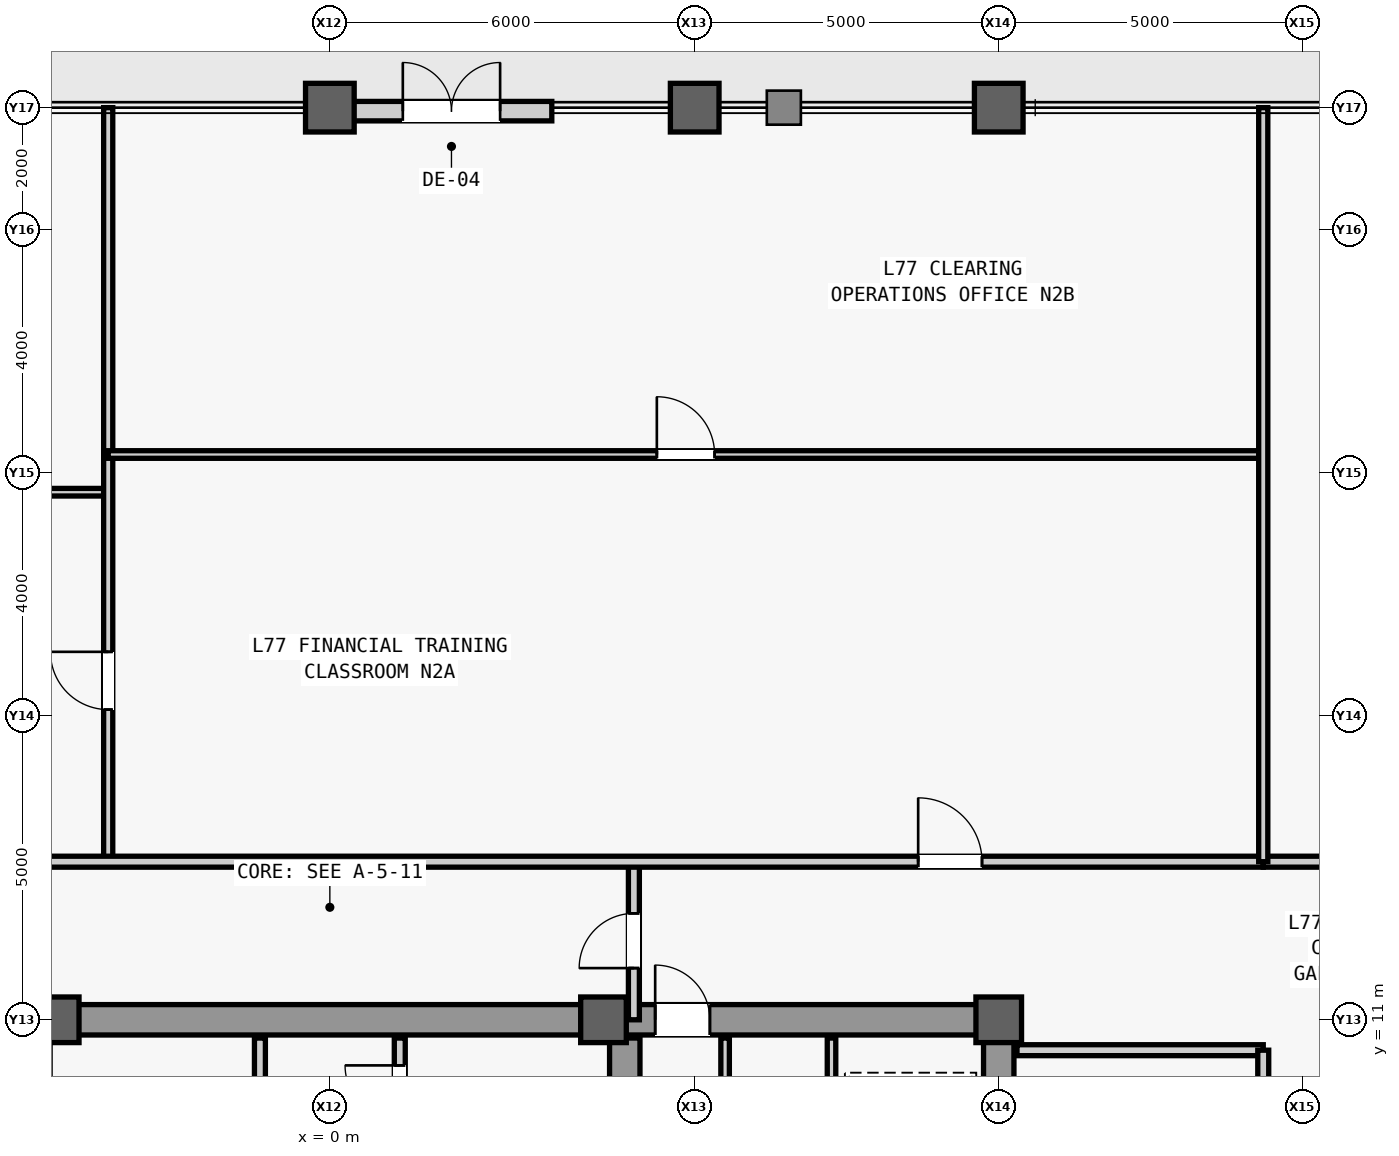
"""IFC4 building model, lengths in metres.
Left out: names, types, materials, properties, quantities, classifications, styles, units other than length and angle.
Written with IfcOpenShell. Run it as: python <this file> out.ifc"""

import sys

from ifc_helpers import new_model, si_unit, direction, frame, frame_2d, origin, origin_2d, place, context, subcontext, project, spatial, rectangle, hollow_rectangle, extrude, source, transform, mapped, element, fill, save


model = new_model("IFC4")
c1 = context("Model", 3, precision=1e-05, world=origin(), true_north=direction((0.0, 1.0)))
c2 = subcontext(c1, "Body", "Model", "MODEL_VIEW")
j1 = project(units=[si_unit("LENGTHUNIT", "METRE"), si_unit("PLANEANGLEUNIT", "RADIAN")], contexts=[c1])
p1 = place(None, origin())
s1 = spatial("IfcSite", under=j1, at=p1, CompositionType="ELEMENT")
p2 = place(p1, origin())
s2 = spatial("IfcBuilding", under=s1, at=p2, CompositionType="ELEMENT")
p3 = place(p2, frame((0.0, 0.0, 326.3)))
s3 = spatial("IfcBuildingStorey", under=s2, at=p3, CompositionType="ELEMENT", Elevation=326.3)
m1 = source(origin(), c2, "Body", "SweptSolid", [
    extrude(rectangle(XDim=22.0, YDim=0.5, at=frame_2d((11.0, 0.0))), origin(), (0.0, 0.0, 1.0), 3.74),
])
p4 = place(p3, frame((11.0, -11.0, 0.0), z_axis=(0.0, 0.0, 1.0), x_axis=(0.0, 1.0, 0.0)))
e1 = element("IfcWall", 1, at=p4, inside=s3, PredefinedType="SHEAR", context=c2, shape_type="MappedRepresentation", body=[
    mapped(m1, transform((0.0, 0.0, 0.0), scale=1.0)),
])
m2 = source(origin(), c2, "Body", "SweptSolid", [
    extrude(rectangle(XDim=1.1, YDim=2.2, at=frame_2d((0.55, 1.1))), frame((0.0, 0.26, 0.0), z_axis=(0.0, -1.0, 0.0), x_axis=(1.0, 0.0, 0.0)), (0.0, 0.0, 1.0), 0.52),
])
p5 = place(p4, frame((0.8, 0.0, 0.0)))
e2 = element("IfcOpeningElement", 2, at=p5, cuts=e1, PredefinedType="OPENING", context=c2, shape_type="MappedRepresentation", body=[
    mapped(m2, transform((0.0, 0.0, 0.0), scale=1.0)),
])
m3 = source(origin(), c2, "Body", "SweptSolid", [
    extrude(rectangle(XDim=0.9, YDim=2.15, at=frame_2d((0.45, 1.075))), frame((0.0, 0.26, 0.0), z_axis=(0.0, -1.0, 0.0), x_axis=(1.0, 0.0, 0.0)), (0.0, 0.0, 1.0), 0.52),
])
p6 = place(p4, frame((7.575, 0.0, 0.0)))
e3 = element("IfcOpeningElement", 3, at=p6, cuts=e1, PredefinedType="OPENING", context=c2, shape_type="MappedRepresentation", body=[
    mapped(m3, transform((0.0, 0.0, 0.0), scale=1.0)),
])
m4 = source(origin(), c2, "Body", "SweptSolid", [
    extrude(rectangle(XDim=1.2, YDim=2.3, at=frame_2d((0.6, 1.15))), frame((0.0, 0.26, 0.0), z_axis=(0.0, -1.0, 0.0), x_axis=(1.0, 0.0, 0.0)), (0.0, 0.0, 1.0), 0.52),
])
p7 = place(p4, frame((17.6, 0.0, 0.0)))
e4 = element("IfcOpeningElement", 4, at=p7, cuts=e1, PredefinedType="OPENING", context=c2, shape_type="MappedRepresentation", body=[
    mapped(m4, transform((0.0, 0.0, 0.0), scale=1.0)),
])
p8 = place(p4, frame((19.6, 0.0, 0.0)))
e5 = element("IfcOpeningElement", 5, at=p8, cuts=e1, PredefinedType="OPENING", context=c2, shape_type="MappedRepresentation", body=[
    mapped(m4, transform((0.0, 0.0, 0.0), scale=1.0)),
])
m5 = source(origin(), c2, "Body", "SweptSolid", [
    extrude(rectangle(XDim=1.3, YDim=2.3, at=frame_2d((0.65, 1.15))), frame((0.0, 0.26, 0.0), z_axis=(0.0, -1.0, 0.0), x_axis=(1.0, 0.0, 0.0)), (0.0, 0.0, 1.0), 0.52),
])
p9 = place(p4, frame((2.7, 0.0, 0.0)))
e6 = element("IfcOpeningElement", 6, at=p9, cuts=e1, PredefinedType="OPENING", context=c2, shape_type="MappedRepresentation", body=[
    mapped(m5, transform((0.0, 0.0, 0.0), scale=1.0)),
])
p10 = place(p4, frame((13.35, 0.0, 0.0)))
e7 = element("IfcOpeningElement", 7, at=p10, cuts=e1, PredefinedType="OPENING", context=c2, shape_type="MappedRepresentation", body=[
    mapped(m5, transform((0.0, 0.0, 0.0), scale=1.0)),
])
m6 = source(origin(), c2, "Body", "SweptSolid", [
    extrude(rectangle(XDim=21.4, YDim=0.5, at=frame_2d((10.7, 0.0))), origin(), (0.0, 0.0, 1.0), 3.74),
])
p11 = place(p3, frame((4.85, -10.7, 0.0), z_axis=(0.0, 0.0, 1.0), x_axis=(0.0, 1.0, 0.0)))
e8 = element("IfcWall", 8, at=p11, inside=s3, PredefinedType="SHEAR", context=c2, shape_type="MappedRepresentation", body=[
    mapped(m6, transform((0.0, 0.0, 0.0), scale=1.0)),
])
m7 = source(origin(), c2, "Body", "SweptSolid", [
    extrude(rectangle(XDim=5.9, YDim=0.5, at=frame_2d((2.95, 0.0))), origin(), (0.0, 0.0, 1.0), 3.74),
])
p12 = place(p3, frame((4.85, 11.0, 0.0), z_axis=(0.0, 0.0, 1.0), x_axis=(1.0, 0.0, 0.0)))
e9 = element("IfcWall", 9, at=p12, inside=s3, PredefinedType="SHEAR", context=c2, shape_type="MappedRepresentation", body=[
    mapped(m7, transform((0.0, 0.0, 0.0), scale=1.0)),
])
p13 = place(p12, frame((0.5, 0.0, 0.0)))
e10 = element("IfcOpeningElement", 10, at=p13, cuts=e9, PredefinedType="OPENING", context=c2, shape_type="MappedRepresentation", body=[
    mapped(m3, transform((0.0, 0.0, 0.0), scale=1.0)),
])
m8 = source(origin(), c2, "Body", "SweptSolid", [
    extrude(rectangle(XDim=9.2, YDim=0.5, at=frame_2d((4.6, 0.0))), origin(), (0.0, 0.0, 1.0), 3.74),
])
p14 = place(p3, frame((-4.6, 11.0, 0.0), z_axis=(0.0, 0.0, 1.0), x_axis=(1.0, 0.0, 0.0)))
e11 = element("IfcWall", 11, at=p14, inside=s3, PredefinedType="SHEAR", context=c2, shape_type="MappedRepresentation", body=[
    mapped(m8, transform((0.0, 0.0, 0.0), scale=1.0)),
])
m9 = source(origin(), c2, "Body", "SweptSolid", [
    extrude(rectangle(XDim=0.75, YDim=0.75, at=origin_2d()), origin(), (0.0, 0.0, 1.0), 4.0),
])
p15 = place(p3, frame((-4.5, 11.0, 0.0), z_axis=(0.0, 0.0, 1.0), x_axis=(1.0, 0.0, 0.0)))
e12 = element("IfcColumn", 12, at=p15, inside=s3, PredefinedType="COLUMN", context=c2, shape_type="MappedRepresentation", body=[
    mapped(m9, transform((0.0, 0.0, 0.0), scale=1.0)),
])
m10 = source(origin(), c2, "Body", "SweptSolid", [
    extrude(hollow_rectangle(XDim=0.8, YDim=0.8, WallThickness=0.045, at=origin_2d()), origin(), (0.0, 0.0, 1.0), 4.0),
])
p16 = place(p3, frame((0.0, 26.0, 0.0), z_axis=(0.0, 0.0, 1.0), x_axis=(1.0, 0.0, 0.0)))
e13 = element("IfcColumn", 13, at=p16, inside=s3, PredefinedType="COLUMN", context=c2, shape_type="MappedRepresentation", body=[
    mapped(m10, transform((0.0, 0.0, 0.0), scale=1.0)),
])
p17 = place(p3, frame((4.5, 11.0, 0.0), z_axis=(0.0, 0.0, 1.0), x_axis=(1.0, 0.0, 0.0)))
e14 = element("IfcColumn", 14, at=p17, inside=s3, PredefinedType="COLUMN", context=c2, shape_type="MappedRepresentation", body=[
    mapped(m9, transform((0.0, 0.0, 0.0), scale=1.0)),
])
p18 = place(p3, frame((6.0, 26.0, 0.0), z_axis=(0.0, 0.0, 1.0), x_axis=(1.0, 0.0, 0.0)))
e15 = element("IfcColumn", 15, at=p18, inside=s3, PredefinedType="COLUMN", context=c2, shape_type="MappedRepresentation", body=[
    mapped(m10, transform((0.0, 0.0, 0.0), scale=1.0)),
])
p19 = place(p3, frame((11.0, 11.0, 0.0), z_axis=(0.0, 0.0, 1.0), x_axis=(1.0, 0.0, 0.0)))
e16 = element("IfcColumn", 16, at=p19, inside=s3, PredefinedType="COLUMN", context=c2, shape_type="MappedRepresentation", body=[
    mapped(m9, transform((0.0, 0.0, 0.0), scale=1.0)),
])
p20 = place(p3, frame((11.0, 26.0, 0.0), z_axis=(0.0, 0.0, 1.0), x_axis=(1.0, 0.0, 0.0)))
e17 = element("IfcColumn", 17, at=p20, inside=s3, PredefinedType="COLUMN", context=c2, shape_type="MappedRepresentation", body=[
    mapped(m10, transform((0.0, 0.0, 0.0), scale=1.0)),
])
m11 = source(origin(), c2, "Body", "SweptSolid", [
    extrude(rectangle(XDim=3.3, YDim=0.32, at=frame_2d((1.65, 0.0))), origin(), (0.0, 0.0, 1.0), 3.191),
])
p21 = place(p3, frame((0.35, 25.942, 0.0), z_axis=(0.0, 0.0, 1.0), x_axis=(1.0, 0.0, 0.0)))
e18 = element("IfcWall", 18, at=p21, inside=s3, PredefinedType="STANDARD", context=c2, shape_type="MappedRepresentation", body=[
    mapped(m11, transform((0.0, 0.0, 0.0), scale=1.0)),
])
m12 = source(origin(), c2, "Body", "SweptSolid", [
    extrude(rectangle(XDim=1.6, YDim=2.25, at=frame_2d((0.8, 1.125))), frame((0.0, 0.17, 0.0), z_axis=(0.0, -1.0, 0.0), x_axis=(1.0, 0.0, 0.0)), (0.0, 0.0, 1.0), 0.34),
])
p22 = place(p21, frame((0.85, 0.0, 0.0)))
e19 = element("IfcOpeningElement", 19, at=p22, cuts=e18, PredefinedType="OPENING", context=c2, shape_type="MappedRepresentation", body=[
    mapped(m12, transform((0.0, 0.0, 0.0), scale=1.0)),
])
m13 = source(origin(), c2, "Body", "SweptSolid", [
    extrude(rectangle(XDim=9.4, YDim=0.14, at=frame_2d((4.7, 0.0))), origin(), (0.0, 0.0, 1.0), 3.74),
])
p23 = place(p3, frame((8.25, 1.3, 0.0), z_axis=(0.0, 0.0, 1.0), x_axis=(0.0, 1.0, 0.0)))
e20 = element("IfcWall", 20, at=p23, inside=s3, PredefinedType="PARTITIONING", context=c2, shape_type="MappedRepresentation", body=[
    mapped(m13, transform((0.0, 0.0, 0.0), scale=1.0)),
])
m14 = source(origin(), c2, "Body", "SweptSolid", [
    extrude(rectangle(XDim=5.7, YDim=0.14, at=frame_2d((2.85, 0.0))), origin(), (0.0, 0.0, 1.0), 3.74),
])
p24 = place(p3, frame((6.5, 5.0, 0.0), z_axis=(0.0, 0.0, 1.0), x_axis=(0.0, 1.0, 0.0)))
e21 = element("IfcWall", 21, at=p24, inside=s3, PredefinedType="PARTITIONING", context=c2, shape_type="MappedRepresentation", body=[
    mapped(m14, transform((0.0, 0.0, 0.0), scale=1.0)),
])
m15 = source(origin(), c2, "Body", "SweptSolid", [
    extrude(rectangle(XDim=0.9, YDim=2.15, at=frame_2d((0.45, 1.075))), frame((0.0, 0.08, 0.0), z_axis=(0.0, -1.0, 0.0), x_axis=(1.0, 0.0, 0.0)), (0.0, 0.0, 1.0), 0.16),
])
p25 = place(p24, frame((2.05, 0.0, 0.0)))
e22 = element("IfcOpeningElement", 22, at=p25, cuts=e21, PredefinedType="OPENING", context=c2, shape_type="MappedRepresentation", body=[
    mapped(m15, transform((0.0, 0.0, 0.0), scale=1.0)),
])
m16 = source(origin(), c2, "Body", "SweptSolid", [
    extrude(rectangle(XDim=4.05, YDim=0.18, at=frame_2d((2.025, 0.0))), origin(), (0.0, 0.0, 1.0), 3.74),
])
p26 = place(p3, frame((11.3, 10.5, 0.0), z_axis=(0.0, 0.0, 1.0), x_axis=(1.0, 0.0, 0.0)))
e23 = element("IfcWall", 23, at=p26, inside=s3, PredefinedType="PARTITIONING", context=c2, shape_type="MappedRepresentation", body=[
    mapped(m16, transform((0.0, 0.0, 0.0), scale=1.0)),
])
m17 = source(origin(), c2, "Body", "SweptSolid", [
    extrude(rectangle(XDim=16.6, YDim=0.18, at=frame_2d((8.3, 0.0))), origin(), (0.0, 0.0, 1.0), 3.74),
])
p27 = place(p3, frame((15.35, -6.1, 0.0), z_axis=(0.0, 0.0, 1.0), x_axis=(0.0, 1.0, 0.0)))
e24 = element("IfcWall", 24, at=p27, inside=s3, PredefinedType="PARTITIONING", context=c2, shape_type="MappedRepresentation", body=[
    mapped(m17, transform((0.0, 0.0, 0.0), scale=1.0)),
])
m18 = source(origin(), c2, "Body", "SweptSolid", [
    extrude(rectangle(XDim=1.8, YDim=2.25, at=frame_2d((0.9, 1.125))), frame((0.0, 0.1, 0.0), z_axis=(0.0, -1.0, 0.0), x_axis=(1.0, 0.0, 0.0)), (0.0, 0.0, 1.0), 0.2),
])
p28 = place(p27, frame((2.7, 0.0, 0.0)))
e25 = element("IfcOpeningElement", 25, at=p28, cuts=e24, PredefinedType="OPENING", context=c2, shape_type="MappedRepresentation", body=[
    mapped(m18, transform((0.0, 0.0, 0.0), scale=1.0)),
])
p29 = place(p27, frame((13.0, 0.0, 0.0)))
e26 = element("IfcOpeningElement", 26, at=p29, cuts=e24, PredefinedType="OPENING", context=c2, shape_type="MappedRepresentation", body=[
    mapped(m18, transform((0.0, 0.0, 0.0), scale=1.0)),
])
m19 = source(origin(), c2, "Body", "SweptSolid", [
    extrude(rectangle(XDim=5.4, YDim=0.18, at=frame_2d((2.7, 0.0))), origin(), (0.0, 0.0, 1.0), 3.74),
])
p30 = place(p3, frame((-1.15, 5.3, 0.0), z_axis=(0.0, 0.0, 1.0), x_axis=(0.0, 1.0, 0.0)))
e27 = element("IfcWall", 27, at=p30, inside=s3, PredefinedType="PARTITIONING", context=c2, shape_type="MappedRepresentation", body=[
    mapped(m19, transform((0.0, 0.0, 0.0), scale=1.0)),
])
m20 = source(origin(), c2, "Body", "SweptSolid", [
    extrude(rectangle(XDim=0.9, YDim=2.15, at=frame_2d((0.45, 1.075))), frame((0.0, 0.1, 0.0), z_axis=(0.0, -1.0, 0.0), x_axis=(1.0, 0.0, 0.0)), (0.0, 0.0, 1.0), 0.2),
])
p31 = place(p30, frame((0.7, 0.0, 0.0)))
e28 = element("IfcOpeningElement", 28, at=p31, cuts=e27, PredefinedType="OPENING", context=c2, shape_type="MappedRepresentation", body=[
    mapped(m20, transform((0.0, 0.0, 0.0), scale=1.0)),
])
p32 = place(p30, frame((3.4, 0.0, 0.0)))
e29 = element("IfcOpeningElement", 29, at=p32, cuts=e27, PredefinedType="OPENING", context=c2, shape_type="MappedRepresentation", body=[
    mapped(m20, transform((0.0, 0.0, 0.0), scale=1.0)),
])
p33 = place(p3, frame((1.15, 5.3, 0.0), z_axis=(0.0, 0.0, 1.0), x_axis=(0.0, 1.0, 0.0)))
e30 = element("IfcWall", 30, at=p33, inside=s3, PredefinedType="PARTITIONING", context=c2, shape_type="MappedRepresentation", body=[
    mapped(m19, transform((0.0, 0.0, 0.0), scale=1.0)),
])
p34 = place(p33, frame((0.45, 0.0, 0.0)))
e31 = element("IfcOpeningElement", 31, at=p34, cuts=e30, PredefinedType="OPENING", context=c2, shape_type="MappedRepresentation", body=[
    mapped(m20, transform((0.0, 0.0, 0.0), scale=1.0)),
])
p35 = place(p33, frame((2.25, 0.0, 0.0)))
e32 = element("IfcOpeningElement", 32, at=p35, cuts=e30, PredefinedType="OPENING", context=c2, shape_type="MappedRepresentation", body=[
    mapped(m20, transform((0.0, 0.0, 0.0), scale=1.0)),
])
p36 = place(p33, frame((4.05, 0.0, 0.0)))
e33 = element("IfcOpeningElement", 33, at=p36, cuts=e30, PredefinedType="OPENING", context=c2, shape_type="MappedRepresentation", body=[
    mapped(m20, transform((0.0, 0.0, 0.0), scale=1.0)),
])
m21 = source(origin(), c2, "Body", "SweptSolid", [
    extrude(rectangle(XDim=2.6, YDim=0.18, at=frame_2d((1.3, 0.0))), origin(), (0.0, 0.0, 1.0), 3.74),
])
p37 = place(p3, frame((5.0, 11.0, 0.0), z_axis=(0.0, 0.0, 1.0), x_axis=(0.0, 1.0, 0.0)))
e34 = element("IfcWall", 34, at=p37, inside=s3, PredefinedType="PARTITIONING", context=c2, shape_type="MappedRepresentation", body=[
    mapped(m21, transform((0.0, 0.0, 0.0), scale=1.0)),
])
p38 = place(p37, frame((0.85, 0.0, 0.0)))
e35 = element("IfcOpeningElement", 35, at=p38, cuts=e34, PredefinedType="OPENING", context=c2, shape_type="MappedRepresentation", body=[
    mapped(m20, transform((0.0, 0.0, 0.0), scale=1.0)),
])
m22 = source(origin(), c2, "Body", "SweptSolid", [
    extrude(rectangle(XDim=2.4, YDim=0.18, at=frame_2d((1.2, 0.0))), origin(), (0.0, 0.0, 1.0), 3.74),
])
p39 = place(p3, frame((15.35, 13.6, 0.0), z_axis=(0.0, 0.0, 1.0), x_axis=(1.0, 0.0, 0.0)))
e36 = element("IfcWall", 36, at=p39, inside=s3, PredefinedType="PARTITIONING", context=c2, shape_type="MappedRepresentation", body=[
    mapped(m22, transform((0.0, 0.0, 0.0), scale=1.0)),
])
m23 = source(origin(), c2, "Body", "SweptSolid", [
    extrude(rectangle(XDim=13.755, YDim=0.125, at=frame_2d((6.877, 0.0))), origin(), (0.0, 0.0, 1.0), 3.393),
])
p40 = place(p3, frame((-17.4, 19.676, 0.0), z_axis=(0.0, 0.0, 1.0), x_axis=(1.0, 0.0, 0.0)))
e37 = element("IfcWall", 37, at=p40, inside=s3, PredefinedType="PARTITIONING", context=c2, shape_type="MappedRepresentation", body=[
    mapped(m23, transform((0.0, 0.0, 0.0), scale=1.0)),
])
m24 = source(origin(), c2, "Body", "SweptSolid", [
    extrude(rectangle(XDim=0.95, YDim=2.15, at=frame_2d((0.475, 1.075))), frame((0.0, 0.073, 0.0), z_axis=(0.0, -1.0, 0.0), x_axis=(1.0, 0.0, 0.0)), (0.0, 0.0, 1.0), 0.145),
])
p41 = place(p40, frame((6.403, 0.0, 0.0)))
e38 = element("IfcOpeningElement", 38, at=p41, cuts=e37, PredefinedType="OPENING", context=c2, shape_type="MappedRepresentation", body=[
    mapped(m24, transform((0.0, 0.0, 0.0), scale=1.0)),
])
m25 = source(origin(), c2, "Body", "SweptSolid", [
    extrude(rectangle(XDim=12.4, YDim=0.15, at=frame_2d((6.2, 0.0))), origin(), (0.0, 0.0, 1.0), 3.74),
])
p42 = place(p3, frame((-3.645, 13.6, 0.0), z_axis=(0.0, 0.0, 1.0), x_axis=(0.0, 1.0, 0.0)))
e39 = element("IfcWall", 39, at=p42, inside=s3, PredefinedType="PARTITIONING", context=c2, shape_type="MappedRepresentation", body=[
    mapped(m25, transform((0.0, 0.0, 0.0), scale=1.0)),
])
m26 = source(origin(), c2, "Body", "SweptSolid", [
    extrude(rectangle(XDim=0.95, YDim=2.15, at=frame_2d((0.475, 1.075))), frame((0.0, 0.085, 0.0), z_axis=(0.0, -1.0, 0.0), x_axis=(1.0, 0.0, 0.0)), (0.0, 0.0, 1.0), 0.17),
])
p43 = place(p42, frame((2.501, 0.0, 0.0)))
e40 = element("IfcOpeningElement", 40, at=p43, cuts=e39, PredefinedType="OPENING", context=c2, shape_type="MappedRepresentation", body=[
    mapped(m26, transform((0.0, 0.0, 0.0), scale=1.0)),
])
m27 = source(origin(), c2, "Body", "SweptSolid", [
    extrude(rectangle(XDim=18.995, YDim=0.125, at=frame_2d((9.498, 0.0))), origin(), (0.0, 0.0, 1.0), 3.74),
])
p44 = place(p3, frame((-3.645, 20.296, 0.0), z_axis=(0.0, 0.0, 1.0), x_axis=(1.0, 0.0, 0.0)))
e41 = element("IfcWall", 41, at=p44, inside=s3, PredefinedType="PARTITIONING", context=c2, shape_type="MappedRepresentation", body=[
    mapped(m27, transform((0.0, 0.0, 0.0), scale=1.0)),
])
p45 = place(p44, frame((9.022, 0.0, 0.0)))
e42 = element("IfcOpeningElement", 42, at=p45, cuts=e41, PredefinedType="OPENING", context=c2, shape_type="MappedRepresentation", body=[
    mapped(m24, transform((0.0, 0.0, 0.0), scale=1.0)),
])
m28 = source(origin(), c2, "Body", "SweptSolid", [
    extrude(rectangle(XDim=32.75, YDim=0.18, at=frame_2d((16.375, 0.0))), origin(), (0.0, 0.0, 1.0), 3.74),
])
p46 = place(p3, frame((-17.4, 13.6, 0.0), z_axis=(0.0, 0.0, 1.0), x_axis=(1.0, 0.0, 0.0)))
e43 = element("IfcWall", 43, at=p46, inside=s3, PredefinedType="PARTITIONING", context=c2, shape_type="MappedRepresentation", body=[
    mapped(m28, transform((0.0, 0.0, 0.0), scale=1.0)),
])
m29 = source(origin(), c2, "Body", "SweptSolid", [
    extrude(rectangle(XDim=1.05, YDim=2.2, at=frame_2d((0.525, 1.1))), frame((0.0, 0.1, 0.0), z_axis=(0.0, -1.0, 0.0), x_axis=(1.0, 0.0, 0.0)), (0.0, 0.0, 1.0), 0.2),
])
p47 = place(p46, frame((27.075, 0.0, 0.0)))
e44 = element("IfcOpeningElement", 44, at=p47, cuts=e43, PredefinedType="OPENING", context=c2, shape_type="MappedRepresentation", body=[
    mapped(m29, transform((0.0, 0.0, 0.0), scale=1.0)),
])
p48 = place(p3, frame((15.35, 13.6, 0.0), z_axis=(0.0, 0.0, 1.0), x_axis=(0.0, 1.0, 0.0)))
e45 = element("IfcWall", 45, at=p48, inside=s3, PredefinedType="PARTITIONING", context=c2, shape_type="MappedRepresentation", body=[
    mapped(m25, transform((0.0, 0.0, 0.0), scale=1.0)),
])
m30 = source(origin(), c2, "Body", "SweptSolid", [
    extrude(rectangle(XDim=1.6, YDim=2.25, at=frame_2d((0.8, 1.125))), frame((0.0, 0.025, 0.0), z_axis=(0.0, -1.0, 0.0), x_axis=(1.0, 0.0, 0.0)), (0.0, 0.0, 1.0), 0.05),
])
p49 = place(p22, origin())
e46 = element("IfcDoor", 46, at=p49, inside=s3, OperationType="DOUBLE_DOOR_SINGLE_SWING", PredefinedType="DOOR", context=c2, shape_type="MappedRepresentation", body=[
    mapped(m30, transform((0.0, 0.0, 0.0), scale=1.0)),
])
fill(e19, e46)
m31 = source(origin(), c2, "Body", "SweptSolid", [
    extrude(rectangle(XDim=0.9, YDim=2.15, at=frame_2d((0.45, 1.075))), frame((0.0, 0.025, 0.0), z_axis=(0.0, -1.0, 0.0), x_axis=(1.0, 0.0, 0.0)), (0.0, 0.0, 1.0), 0.05),
])
p50 = place(p13, origin())
e47 = element("IfcDoor", 47, at=p50, inside=s3, OperationType="SINGLE_SWING_LEFT", PredefinedType="DOOR", context=c2, shape_type="MappedRepresentation", body=[
    mapped(m31, transform((0.0, 0.0, 0.0), scale=1.0)),
])
fill(e10, e47)
p51 = place(p36, origin())
e48 = element("IfcDoor", 48, at=p51, inside=s3, OperationType="SINGLE_SWING_RIGHT", PredefinedType="DOOR", context=c2, shape_type="MappedRepresentation", body=[
    mapped(m31, transform((0.0, 0.0, 0.0), scale=1.0)),
])
fill(e33, e48)
p52 = place(p38, origin())
e49 = element("IfcDoor", 49, at=p52, inside=s3, OperationType="SINGLE_SWING_LEFT", PredefinedType="DOOR", context=c2, shape_type="MappedRepresentation", body=[
    mapped(m31, transform((0.0, 0.0, 0.0), scale=1.0)),
])
fill(e35, e49)
m32 = source(origin(), c2, "Body", "SweptSolid", [
    extrude(rectangle(XDim=0.95, YDim=2.15, at=frame_2d((0.475, 1.075))), frame((0.0, 0.025, 0.0), z_axis=(0.0, -1.0, 0.0), x_axis=(1.0, 0.0, 0.0)), (0.0, 0.0, 1.0), 0.05),
])
p53 = place(p43, origin())
e50 = element("IfcDoor", 50, at=p53, inside=s3, OperationType="SINGLE_SWING_RIGHT", PredefinedType="DOOR", context=c2, shape_type="MappedRepresentation", body=[
    mapped(m32, transform((0.0, 0.0, 0.0), scale=1.0)),
])
fill(e40, e50)
p54 = place(p45, origin())
e51 = element("IfcDoor", 51, at=p54, inside=s3, OperationType="SINGLE_SWING_LEFT", PredefinedType="DOOR", context=c2, shape_type="MappedRepresentation", body=[
    mapped(m32, transform((0.0, 0.0, 0.0), scale=1.0)),
])
fill(e42, e51)
m33 = source(origin(), c2, "Body", "SweptSolid", [
    extrude(rectangle(XDim=1.05, YDim=2.2, at=frame_2d((0.525, 1.1))), frame((0.0, 0.025, 0.0), z_axis=(0.0, -1.0, 0.0), x_axis=(1.0, 0.0, 0.0)), (0.0, 0.0, 1.0), 0.05),
])
p55 = place(p47, origin())
e52 = element("IfcDoor", 52, at=p55, inside=s3, OperationType="SINGLE_SWING_LEFT", PredefinedType="DOOR", context=c2, shape_type="MappedRepresentation", body=[
    mapped(m33, transform((0.0, 0.0, 0.0), scale=1.0)),
])
fill(e44, e52)
save(model, sys.argv[1])
